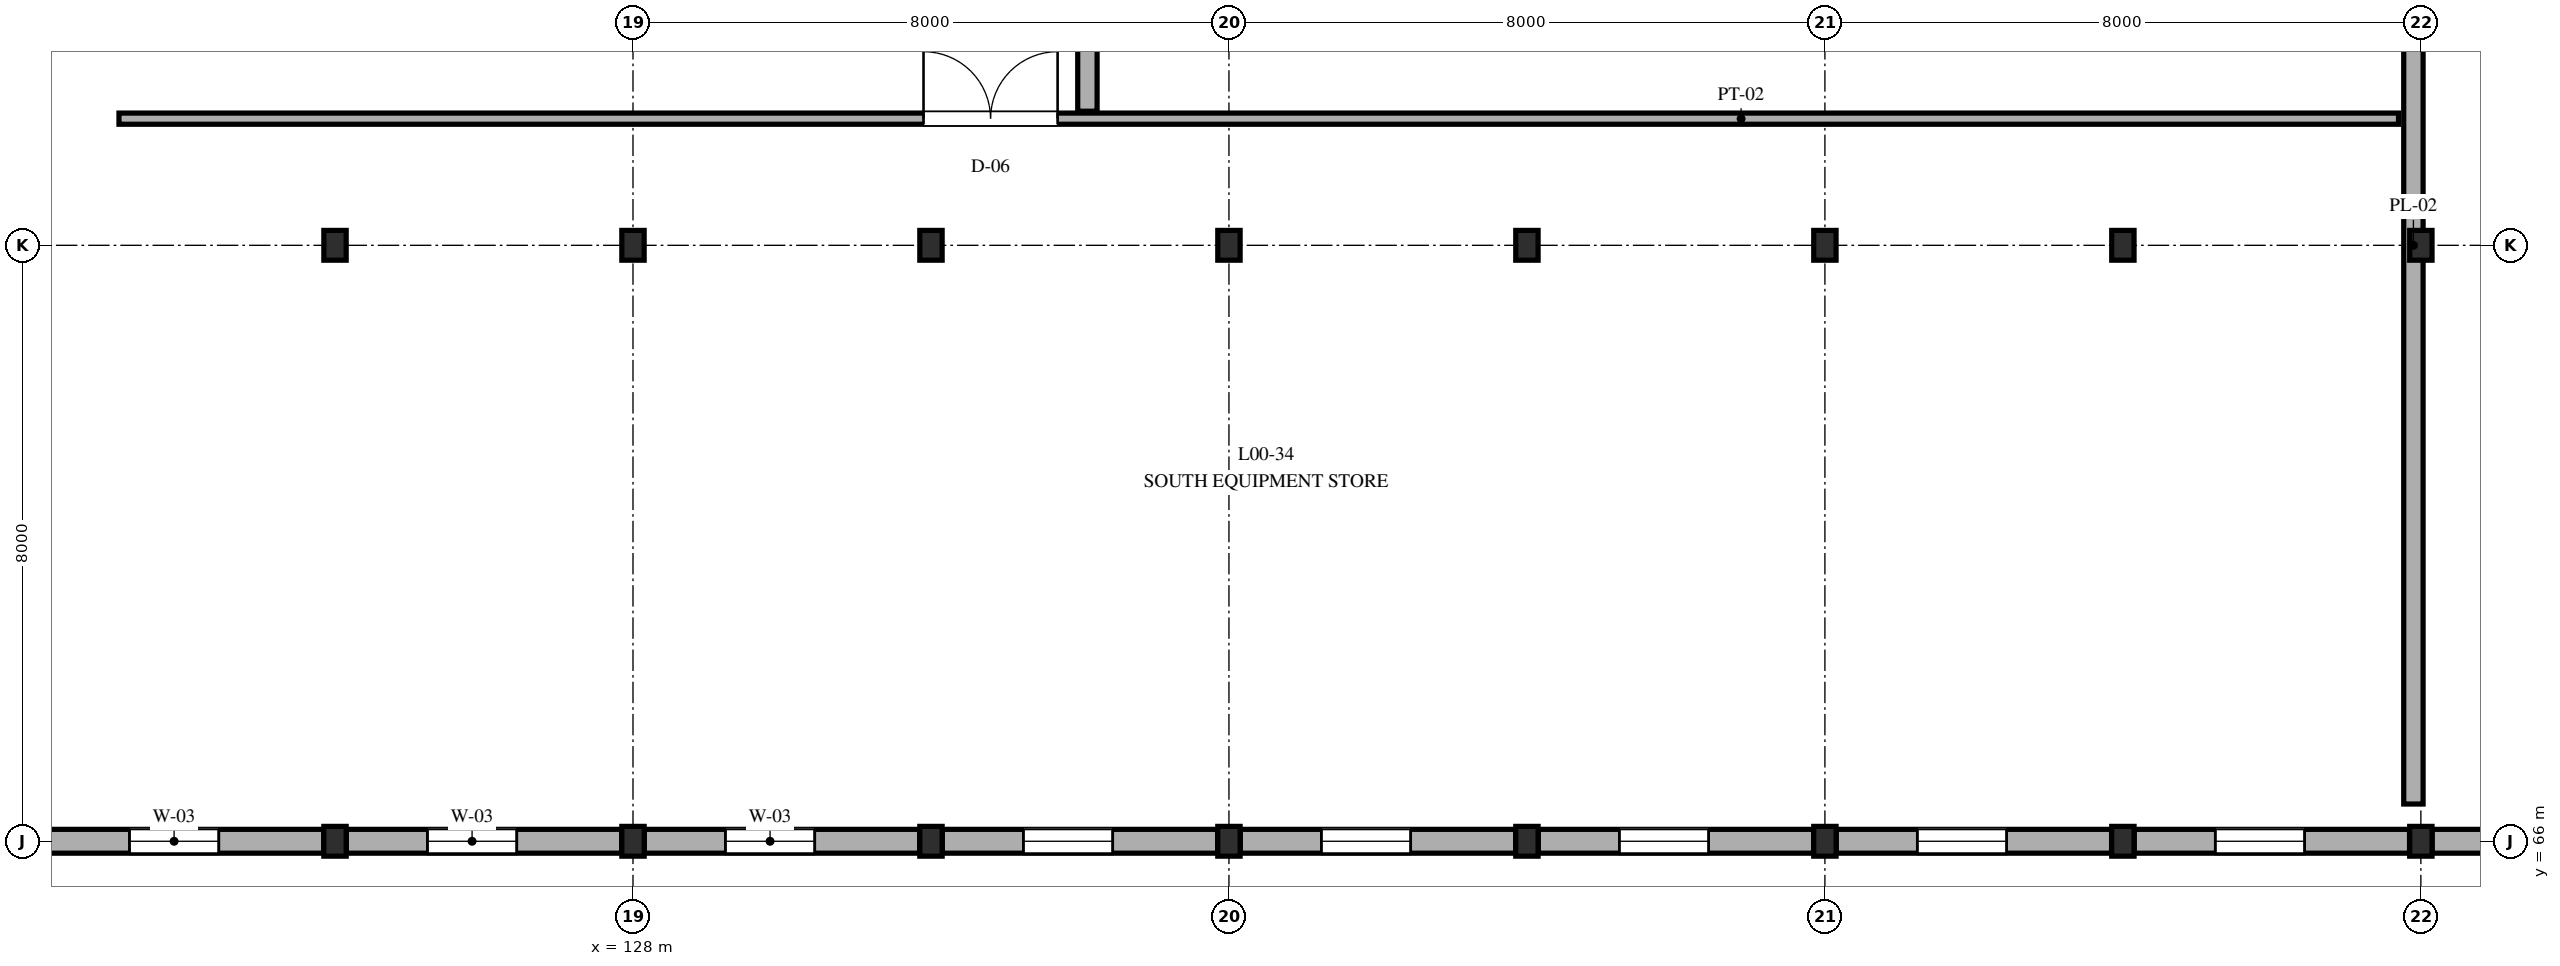
"""IFC4 building model, lengths in metres.
Left out: names, types, materials, properties, quantities, classifications, styles, units other than length and angle.
Written with IfcOpenShell. Run it as: python <this file> out.ifc"""

import sys

from ifc_helpers import new_model, si_unit, direction, frame, frame_2d, origin, origin_2d, place, context, subcontext, project, spatial, rectangle, i_section, extrude, element, fill, save


model = new_model("IFC4")
c1 = context("Model", 3, precision=1e-05, world=origin(), true_north=direction((0.0, 1.0)))
c2 = subcontext(c1, "Body", "Model", "MODEL_VIEW")
j1 = project(units=[si_unit("LENGTHUNIT", "METRE"), si_unit("PLANEANGLEUNIT", "RADIAN")], contexts=[c1])
p1 = place(None, origin())
s1 = spatial("IfcSite", under=j1, at=p1, CompositionType="ELEMENT")
p2 = place(p1, origin())
s2 = spatial("IfcBuilding", under=s1, at=p2, CompositionType="ELEMENT")
p3 = place(p2, origin())
s3 = spatial("IfcBuildingStorey", under=s2, at=p3, CompositionType="ELEMENT", Elevation=0.0)
for number, where, z_axis, x_axis in (
    (1, (124.0, 66.0, 0.0), (0.0, 0.0, 1.0), (1.0, 0.0, 0.0)),
    (2, (124.0, 74.0, 0.0), (0.0, 0.0, 1.0), (1.0, 0.0, 0.0)),
    (3, (128.0, 66.0, 0.0), (0.0, 0.0, 1.0), (1.0, 0.0, 0.0)),
    (4, (128.0, 74.0, 0.0), (0.0, 0.0, 1.0), (1.0, 0.0, 0.0)),
    (5, (132.0, 66.0, 0.0), (0.0, 0.0, 1.0), (1.0, 0.0, 0.0)),
    (6, (132.0, 74.0, 0.0), (0.0, 0.0, 1.0), (1.0, 0.0, 0.0)),
    (7, (136.0, 66.0, 0.0), (0.0, 0.0, 1.0), (1.0, 0.0, 0.0)),
    (8, (136.0, 74.0, 0.0), (0.0, 0.0, 1.0), (1.0, 0.0, 0.0)),
    (9, (140.0, 66.0, 0.0), (0.0, 0.0, 1.0), (1.0, 0.0, 0.0)),
    (10, (140.0, 74.0, 0.0), (0.0, 0.0, 1.0), (1.0, 0.0, 0.0)),
    (11, (144.0, 66.0, 0.0), (0.0, 0.0, 1.0), (1.0, 0.0, 0.0)),
    (12, (144.0, 74.0, 0.0), (0.0, 0.0, 1.0), (1.0, 0.0, 0.0)),
    (13, (148.0, 66.0, 0.0), (0.0, 0.0, 1.0), (1.0, 0.0, 0.0)),
    (14, (148.0, 74.0, 0.0), (0.0, 0.0, 1.0), (1.0, 0.0, 0.0)),
    (15, (152.0, 66.0, 0.0), (0.0, 0.0, 1.0), (1.0, 0.0, 0.0)),
    (16, (152.0, 74.0, 0.0), (0.0, 0.0, 1.0), (1.0, 0.0, 0.0)),
):
    element("IfcColumn", number, at=place(p3, frame(where, z_axis=z_axis, x_axis=x_axis)), inside=s3, PredefinedType="COLUMN", context=c2, shape_type="SweptSolid", body=[
        extrude(i_section(OverallWidth=0.3, OverallDepth=0.4, WebThickness=0.013, FlangeThickness=0.024, FilletRadius=0.027, at=origin_2d()), origin(), (0.0, 0.0, 1.0), 4.8),
    ])
p4 = place(p3, frame((120.152, 66.0, 0.0), z_axis=(0.0, 0.0, 1.0), x_axis=(1.0, 0.0, 0.0)))
e17 = element("IfcWall", 17, at=p4, inside=s3, PredefinedType="STANDARD", context=c2, shape_type="SweptSolid", body=[
    extrude(rectangle(XDim=3.696, YDim=0.32, at=frame_2d((1.848, 0.0))), origin(), (0.0, 0.0, 1.0), 4.255),
])
p5 = place(p4, frame((1.088, 0.0, 0.95)))
e18 = element("IfcOpeningElement", 18, at=p5, cuts=e17, PredefinedType="OPENING", context=c2, shape_type="SweptSolid", body=[
    extrude(rectangle(XDim=1.2, YDim=1.5, at=frame_2d((0.6, 0.75))), frame((0.0, 0.17, 0.0), z_axis=(0.0, -1.0, 0.0), x_axis=(1.0, 0.0, 0.0)), (0.0, 0.0, 1.0), 0.34),
])
p6 = place(p3, frame((124.152, 66.0, 0.0), z_axis=(0.0, 0.0, 1.0), x_axis=(1.0, 0.0, 0.0)))
e19 = element("IfcWall", 19, at=p6, inside=s3, PredefinedType="STANDARD", context=c2, shape_type="SweptSolid", body=[
    extrude(rectangle(XDim=3.696, YDim=0.32, at=frame_2d((1.848, 0.0))), origin(), (0.0, 0.0, 1.0), 4.255),
])
p7 = place(p6, frame((1.088, 0.0, 0.95)))
e20 = element("IfcOpeningElement", 20, at=p7, cuts=e19, PredefinedType="OPENING", context=c2, shape_type="SweptSolid", body=[
    extrude(rectangle(XDim=1.2, YDim=1.5, at=frame_2d((0.6, 0.75))), frame((0.0, 0.17, 0.0), z_axis=(0.0, -1.0, 0.0), x_axis=(1.0, 0.0, 0.0)), (0.0, 0.0, 1.0), 0.34),
])
p8 = place(p3, frame((128.152, 66.0, 0.0), z_axis=(0.0, 0.0, 1.0), x_axis=(1.0, 0.0, 0.0)))
e21 = element("IfcWall", 21, at=p8, inside=s3, PredefinedType="STANDARD", context=c2, shape_type="SweptSolid", body=[
    extrude(rectangle(XDim=3.696, YDim=0.32, at=frame_2d((1.848, 0.0))), origin(), (0.0, 0.0, 1.0), 4.255),
])
p9 = place(p8, frame((1.088, 0.0, 0.95)))
e22 = element("IfcOpeningElement", 22, at=p9, cuts=e21, PredefinedType="OPENING", context=c2, shape_type="SweptSolid", body=[
    extrude(rectangle(XDim=1.2, YDim=1.5, at=frame_2d((0.6, 0.75))), frame((0.0, 0.17, 0.0), z_axis=(0.0, -1.0, 0.0), x_axis=(1.0, 0.0, 0.0)), (0.0, 0.0, 1.0), 0.34),
])
p10 = place(p3, frame((132.152, 66.0, 0.0), z_axis=(0.0, 0.0, 1.0), x_axis=(1.0, 0.0, 0.0)))
e23 = element("IfcWall", 23, at=p10, inside=s3, PredefinedType="STANDARD", context=c2, shape_type="SweptSolid", body=[
    extrude(rectangle(XDim=3.696, YDim=0.32, at=frame_2d((1.848, 0.0))), origin(), (0.0, 0.0, 1.0), 4.255),
])
p11 = place(p10, frame((1.088, 0.0, 0.95)))
e24 = element("IfcOpeningElement", 24, at=p11, cuts=e23, PredefinedType="OPENING", context=c2, shape_type="SweptSolid", body=[
    extrude(rectangle(XDim=1.2, YDim=1.5, at=frame_2d((0.6, 0.75))), frame((0.0, 0.17, 0.0), z_axis=(0.0, -1.0, 0.0), x_axis=(1.0, 0.0, 0.0)), (0.0, 0.0, 1.0), 0.34),
])
p12 = place(p3, frame((136.152, 66.0, 0.0), z_axis=(0.0, 0.0, 1.0), x_axis=(1.0, 0.0, 0.0)))
e25 = element("IfcWall", 25, at=p12, inside=s3, PredefinedType="STANDARD", context=c2, shape_type="SweptSolid", body=[
    extrude(rectangle(XDim=3.696, YDim=0.32, at=frame_2d((1.848, 0.0))), origin(), (0.0, 0.0, 1.0), 4.255),
])
p13 = place(p12, frame((1.088, 0.0, 0.95)))
e26 = element("IfcOpeningElement", 26, at=p13, cuts=e25, PredefinedType="OPENING", context=c2, shape_type="SweptSolid", body=[
    extrude(rectangle(XDim=1.2, YDim=1.5, at=frame_2d((0.6, 0.75))), frame((0.0, 0.17, 0.0), z_axis=(0.0, -1.0, 0.0), x_axis=(1.0, 0.0, 0.0)), (0.0, 0.0, 1.0), 0.34),
])
p14 = place(p3, frame((140.152, 66.0, 0.0), z_axis=(0.0, 0.0, 1.0), x_axis=(1.0, 0.0, 0.0)))
e27 = element("IfcWall", 27, at=p14, inside=s3, PredefinedType="STANDARD", context=c2, shape_type="SweptSolid", body=[
    extrude(rectangle(XDim=3.696, YDim=0.32, at=frame_2d((1.848, 0.0))), origin(), (0.0, 0.0, 1.0), 4.255),
])
p15 = place(p14, frame((1.088, 0.0, 0.95)))
e28 = element("IfcOpeningElement", 28, at=p15, cuts=e27, PredefinedType="OPENING", context=c2, shape_type="SweptSolid", body=[
    extrude(rectangle(XDim=1.2, YDim=1.5, at=frame_2d((0.6, 0.75))), frame((0.0, 0.17, 0.0), z_axis=(0.0, -1.0, 0.0), x_axis=(1.0, 0.0, 0.0)), (0.0, 0.0, 1.0), 0.34),
])
p16 = place(p3, frame((144.152, 66.0, 0.0), z_axis=(0.0, 0.0, 1.0), x_axis=(1.0, 0.0, 0.0)))
e29 = element("IfcWall", 29, at=p16, inside=s3, PredefinedType="STANDARD", context=c2, shape_type="SweptSolid", body=[
    extrude(rectangle(XDim=3.696, YDim=0.32, at=frame_2d((1.848, 0.0))), origin(), (0.0, 0.0, 1.0), 4.255),
])
p17 = place(p16, frame((1.088, 0.0, 0.95)))
e30 = element("IfcOpeningElement", 30, at=p17, cuts=e29, PredefinedType="OPENING", context=c2, shape_type="SweptSolid", body=[
    extrude(rectangle(XDim=1.2, YDim=1.5, at=frame_2d((0.6, 0.75))), frame((0.0, 0.17, 0.0), z_axis=(0.0, -1.0, 0.0), x_axis=(1.0, 0.0, 0.0)), (0.0, 0.0, 1.0), 0.34),
])
p18 = place(p3, frame((148.152, 66.0, 0.0), z_axis=(0.0, 0.0, 1.0), x_axis=(1.0, 0.0, 0.0)))
e31 = element("IfcWall", 31, at=p18, inside=s3, PredefinedType="STANDARD", context=c2, shape_type="SweptSolid", body=[
    extrude(rectangle(XDim=3.696, YDim=0.32, at=frame_2d((1.848, 0.0))), origin(), (0.0, 0.0, 1.0), 4.255),
])
p19 = place(p18, frame((1.088, 0.0, 0.95)))
e32 = element("IfcOpeningElement", 32, at=p19, cuts=e31, PredefinedType="OPENING", context=c2, shape_type="SweptSolid", body=[
    extrude(rectangle(XDim=1.2, YDim=1.5, at=frame_2d((0.6, 0.75))), frame((0.0, 0.17, 0.0), z_axis=(0.0, -1.0, 0.0), x_axis=(1.0, 0.0, 0.0)), (0.0, 0.0, 1.0), 0.34),
])
p20 = place(p3, frame((152.152, 66.0, 0.0), z_axis=(0.0, 0.0, 1.0), x_axis=(1.0, 0.0, 0.0)))
e33 = element("IfcWall", 33, at=p20, inside=s3, PredefinedType="STANDARD", context=c2, shape_type="SweptSolid", body=[
    extrude(rectangle(XDim=7.696, YDim=0.32, at=frame_2d((3.848, 0.0))), origin(), (0.0, 0.0, 1.0), 4.255),
])
p21 = place(p20, frame((1.738, 0.0, 0.0)))
e34 = element("IfcOpeningElement", 34, at=p21, cuts=e33, PredefinedType="OPENING", context=c2, shape_type="SweptSolid", body=[
    extrude(rectangle(XDim=4.2, YDim=3.6, at=frame_2d((2.1, 1.8))), frame((0.0, 0.17, 0.0), z_axis=(0.0, -1.0, 0.0), x_axis=(1.0, 0.0, 0.0)), (0.0, 0.0, 1.0), 0.34),
])
p22 = place(p3, frame((134.1, 75.8, 0.0), z_axis=(0.0, 0.0, 1.0), x_axis=(0.0, 1.0, 0.0)))
e35 = element("IfcWall", 35, at=p22, inside=s3, PredefinedType="PLUMBINGWALL", context=c2, shape_type="SweptSolid", body=[
    extrude(rectangle(XDim=11.9, YDim=0.26, at=frame_2d((5.95, 0.0))), origin(), (0.0, 0.0, 1.0), 4.05),
])
p23 = place(p3, frame((151.9, 66.5, 0.0), z_axis=(0.0, 0.0, 1.0), x_axis=(0.0, 1.0, 0.0)))
e36 = element("IfcWall", 36, at=p23, inside=s3, PredefinedType="PLUMBINGWALL", context=c2, shape_type="SweptSolid", body=[
    extrude(rectangle(XDim=21.2, YDim=0.26, at=frame_2d((10.6, 0.0))), origin(), (0.0, 0.0, 1.0), 4.05),
])
p24 = place(p3, frame((121.1, 75.7, 0.0), z_axis=(0.0, 0.0, 1.0), x_axis=(1.0, 0.0, 0.0)))
e37 = element("IfcWall", 37, at=p24, inside=s3, PredefinedType="PARTITIONING", context=c2, shape_type="SweptSolid", body=[
    extrude(rectangle(XDim=30.6, YDim=0.15, at=frame_2d((15.3, 0.0))), origin(), (0.0, 0.0, 1.0), 4.05),
])
p25 = place(p24, frame((10.8, 0.0, 0.0)))
e38 = element("IfcOpeningElement", 38, at=p25, cuts=e37, PredefinedType="OPENING", context=c2, shape_type="SweptSolid", body=[
    extrude(rectangle(XDim=1.8, YDim=2.25, at=frame_2d((0.9, 1.125))), frame((0.0, 0.085, 0.0), z_axis=(0.0, -1.0, 0.0), x_axis=(1.0, 0.0, 0.0)), (0.0, 0.0, 1.0), 0.17),
])
p26 = place(p5, origin())
e39 = element("IfcWindow", 39, at=p26, inside=s3, PartitioningType="SINGLE_PANEL", PredefinedType="WINDOW", context=c2, shape_type="SweptSolid", body=[
    extrude(rectangle(XDim=1.2, YDim=1.5, at=frame_2d((0.6, 0.75))), frame((0.0, 0.03, 0.0), z_axis=(0.0, -1.0, 0.0), x_axis=(1.0, 0.0, 0.0)), (0.0, 0.0, 1.0), 0.06),
])
fill(e18, e39)
p27 = place(p7, origin())
e40 = element("IfcWindow", 40, at=p27, inside=s3, PartitioningType="SINGLE_PANEL", PredefinedType="WINDOW", context=c2, shape_type="SweptSolid", body=[
    extrude(rectangle(XDim=1.2, YDim=1.5, at=frame_2d((0.6, 0.75))), frame((0.0, 0.03, 0.0), z_axis=(0.0, -1.0, 0.0), x_axis=(1.0, 0.0, 0.0)), (0.0, 0.0, 1.0), 0.06),
])
fill(e20, e40)
p28 = place(p9, origin())
e41 = element("IfcWindow", 41, at=p28, inside=s3, PartitioningType="SINGLE_PANEL", PredefinedType="WINDOW", context=c2, shape_type="SweptSolid", body=[
    extrude(rectangle(XDim=1.2, YDim=1.5, at=frame_2d((0.6, 0.75))), frame((0.0, 0.03, 0.0), z_axis=(0.0, -1.0, 0.0), x_axis=(1.0, 0.0, 0.0)), (0.0, 0.0, 1.0), 0.06),
])
fill(e22, e41)
p29 = place(p11, origin())
e42 = element("IfcWindow", 42, at=p29, inside=s3, PartitioningType="SINGLE_PANEL", PredefinedType="WINDOW", context=c2, shape_type="SweptSolid", body=[
    extrude(rectangle(XDim=1.2, YDim=1.5, at=frame_2d((0.6, 0.75))), frame((0.0, 0.03, 0.0), z_axis=(0.0, -1.0, 0.0), x_axis=(1.0, 0.0, 0.0)), (0.0, 0.0, 1.0), 0.06),
])
fill(e24, e42)
p30 = place(p13, origin())
e43 = element("IfcWindow", 43, at=p30, inside=s3, PartitioningType="SINGLE_PANEL", PredefinedType="WINDOW", context=c2, shape_type="SweptSolid", body=[
    extrude(rectangle(XDim=1.2, YDim=1.5, at=frame_2d((0.6, 0.75))), frame((0.0, 0.03, 0.0), z_axis=(0.0, -1.0, 0.0), x_axis=(1.0, 0.0, 0.0)), (0.0, 0.0, 1.0), 0.06),
])
fill(e26, e43)
p31 = place(p15, origin())
e44 = element("IfcWindow", 44, at=p31, inside=s3, PartitioningType="SINGLE_PANEL", PredefinedType="WINDOW", context=c2, shape_type="SweptSolid", body=[
    extrude(rectangle(XDim=1.2, YDim=1.5, at=frame_2d((0.6, 0.75))), frame((0.0, 0.03, 0.0), z_axis=(0.0, -1.0, 0.0), x_axis=(1.0, 0.0, 0.0)), (0.0, 0.0, 1.0), 0.06),
])
fill(e28, e44)
p32 = place(p17, origin())
e45 = element("IfcWindow", 45, at=p32, inside=s3, PartitioningType="SINGLE_PANEL", PredefinedType="WINDOW", context=c2, shape_type="SweptSolid", body=[
    extrude(rectangle(XDim=1.2, YDim=1.5, at=frame_2d((0.6, 0.75))), frame((0.0, 0.03, 0.0), z_axis=(0.0, -1.0, 0.0), x_axis=(1.0, 0.0, 0.0)), (0.0, 0.0, 1.0), 0.06),
])
fill(e30, e45)
p33 = place(p19, origin())
e46 = element("IfcWindow", 46, at=p33, inside=s3, PartitioningType="SINGLE_PANEL", PredefinedType="WINDOW", context=c2, shape_type="SweptSolid", body=[
    extrude(rectangle(XDim=1.2, YDim=1.5, at=frame_2d((0.6, 0.75))), frame((0.0, 0.03, 0.0), z_axis=(0.0, -1.0, 0.0), x_axis=(1.0, 0.0, 0.0)), (0.0, 0.0, 1.0), 0.06),
])
fill(e32, e46)
p34 = place(p25, origin())
e47 = element("IfcDoor", 47, at=p34, inside=s3, OperationType="DOUBLE_DOOR_SINGLE_SWING", PredefinedType="DOOR", context=c2, shape_type="SweptSolid", body=[
    extrude(rectangle(XDim=1.8, YDim=2.25, at=frame_2d((0.9, 1.125))), frame((0.0, 0.025, 0.0), z_axis=(0.0, -1.0, 0.0), x_axis=(1.0, 0.0, 0.0)), (0.0, 0.0, 1.0), 0.05),
])
fill(e38, e47)
save(model, sys.argv[1])
